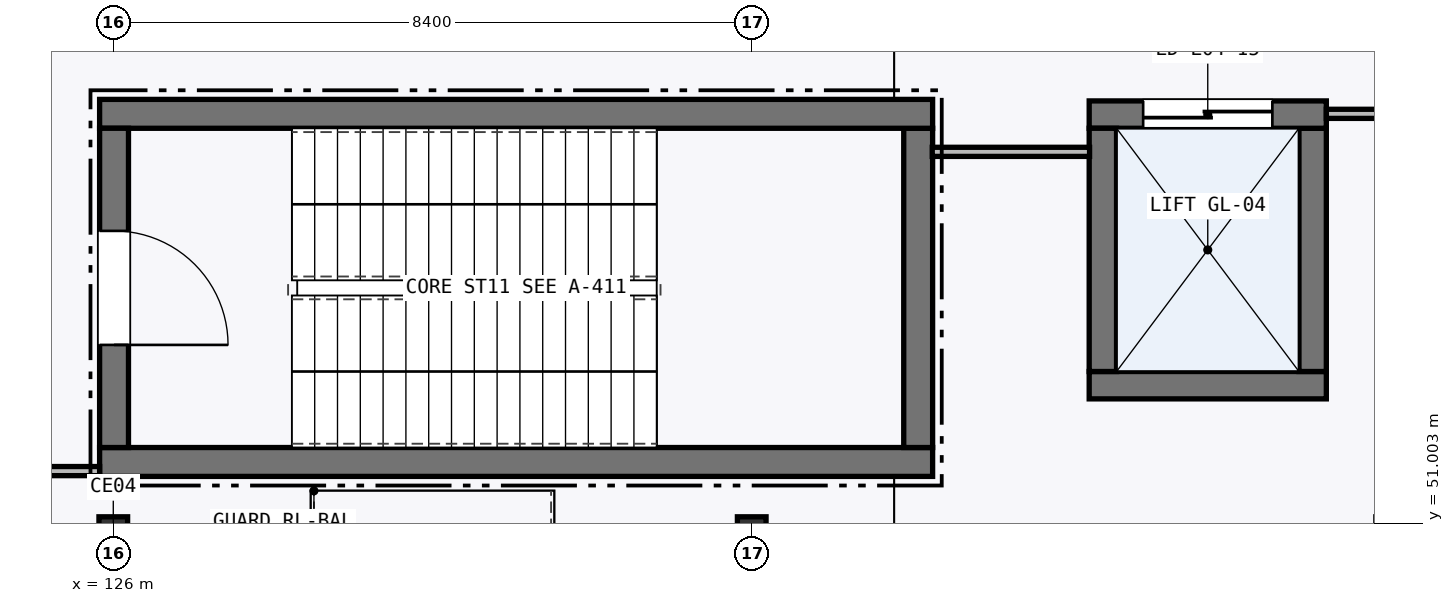
"""IFC4 building model, lengths in metres.
Left out: names, types, materials, properties, quantities, classifications, styles, units other than length and angle.
Written with IfcOpenShell. Run it as: python <this file> out.ifc"""

import sys

from ifc_helpers import new_model, si_unit, direction, frame, frame_2d, origin, origin_2d, place, context, subcontext, project, spatial, rectangle, hollow_circle, extrude, element, fill, save


model = new_model("IFC4")
c1 = context("Model", 3, precision=1e-05, world=origin(), true_north=direction((0.0, 1.0)))
c2 = subcontext(c1, "Body", "Model", "MODEL_VIEW")
j1 = project(units=[si_unit("LENGTHUNIT", "METRE"), si_unit("PLANEANGLEUNIT", "RADIAN")], contexts=[c1])
p1 = place(None, origin())
s1 = spatial("IfcSite", under=j1, at=p1, CompositionType="ELEMENT")
p2 = place(p1, origin())
s2 = spatial("IfcBuilding", under=s1, at=p2, CompositionType="ELEMENT")
p3 = place(p2, frame((0.0, 0.0, 16.5)))
s3 = spatial("IfcBuildingStorey", under=s2, at=p3, CompositionType="ELEMENT", Elevation=16.5)
for number, where, z_axis, x_axis in (
    (1, (126.0, 50.9, 0.0), (0.0, 0.0, 1.0), (1.0, 0.0, 0.0)),
    (2, (134.4, 50.9, 0.0), (0.0, 0.0, 1.0), (1.0, 0.0, 0.0)),
):
    element("IfcColumn", number, at=place(p3, frame(where, z_axis=z_axis, x_axis=x_axis)), inside=s3, PredefinedType="COLUMN", context=c2, shape_type="SweptSolid", body=[
        extrude(hollow_circle(Radius=0.188, WallThickness=0.014, at=origin_2d()), origin(), (0.0, 0.0, 1.0), 5.1),
    ])
p4 = place(p3, frame((125.82, 51.81, 0.0), z_axis=(0.0, 0.0, 1.0), x_axis=(1.0, 0.0, 0.0)))
e3 = element("IfcWall", 3, at=p4, inside=s3, PredefinedType="SHEAR", context=c2, shape_type="SweptSolid", body=[
    extrude(rectangle(XDim=10.96, YDim=0.38, at=frame_2d((5.48, 0.0))), origin(), (0.0, 0.0, 1.0), 4.845),
])
p5 = place(p3, frame((136.59, 52.0, 0.0), z_axis=(0.0, 0.0, 1.0), x_axis=(0.0, 1.0, 0.0)))
e4 = element("IfcWall", 4, at=p5, inside=s3, PredefinedType="SHEAR", context=c2, shape_type="SweptSolid", body=[
    extrude(rectangle(XDim=4.2, YDim=0.38, at=frame_2d((2.1, 0.0))), origin(), (0.0, 0.0, 1.0), 4.845),
])
p6 = place(p3, frame((136.78, 56.39, 0.0), z_axis=(0.0, 0.0, 1.0), x_axis=(-1.0, 0.0, 0.0)))
e5 = element("IfcWall", 5, at=p6, inside=s3, PredefinedType="SHEAR", context=c2, shape_type="SweptSolid", body=[
    extrude(rectangle(XDim=10.96, YDim=0.38, at=frame_2d((5.48, 0.0))), origin(), (0.0, 0.0, 1.0), 4.845),
])
p7 = place(p3, frame((126.01, 56.2, 0.0), z_axis=(0.0, 0.0, 1.0), x_axis=(0.0, -1.0, 0.0)))
e6 = element("IfcWall", 6, at=p7, inside=s3, PredefinedType="SHEAR", context=c2, shape_type="SweptSolid", body=[
    extrude(rectangle(XDim=4.2, YDim=0.38, at=frame_2d((2.1, 0.0))), origin(), (0.0, 0.0, 1.0), 4.845),
])
p8 = place(p7, frame((1.35, 0.0, 0.0)))
e7 = element("IfcOpeningElement", 7, at=p8, cuts=e6, PredefinedType="OPENING", context=c2, shape_type="SweptSolid", body=[
    extrude(rectangle(XDim=1.5, YDim=2.15, at=frame_2d((0.75, 1.075))), frame((0.0, 0.2, 0.0), z_axis=(0.0, -1.0, 0.0), x_axis=(1.0, 0.0, 0.0)), (0.0, 0.0, 1.0), 0.4),
])
p9 = place(p3, frame((138.84, 52.82, 0.0), z_axis=(0.0, 0.0, 1.0), x_axis=(1.0, 0.0, 0.0)))
e8 = element("IfcWall", 8, at=p9, inside=s3, PredefinedType="SHEAR", context=c2, shape_type="SweptSolid", body=[
    extrude(rectangle(XDim=3.12, YDim=0.36, at=frame_2d((1.56, 0.0))), origin(), (0.0, 0.0, 1.0), 4.845),
])
p10 = place(p3, frame((141.78, 53.0, 0.0), z_axis=(0.0, 0.0, 1.0), x_axis=(0.0, 1.0, 0.0)))
e9 = element("IfcWall", 9, at=p10, inside=s3, PredefinedType="SHEAR", context=c2, shape_type="SweptSolid", body=[
    extrude(rectangle(XDim=3.2, YDim=0.36, at=frame_2d((1.6, 0.0))), origin(), (0.0, 0.0, 1.0), 4.845),
])
p11 = place(p3, frame((141.96, 56.38, 0.0), z_axis=(0.0, 0.0, 1.0), x_axis=(-1.0, 0.0, 0.0)))
e10 = element("IfcWall", 10, at=p11, inside=s3, PredefinedType="SHEAR", context=c2, shape_type="SweptSolid", body=[
    extrude(rectangle(XDim=3.12, YDim=0.36, at=frame_2d((1.56, 0.0))), origin(), (0.0, 0.0, 1.0), 4.845),
])
p12 = place(p11, frame((0.71, 0.0, 0.0)))
e11 = element("IfcOpeningElement", 11, at=p12, cuts=e10, PredefinedType="OPENING", context=c2, shape_type="SweptSolid", body=[
    extrude(rectangle(XDim=1.7, YDim=2.3, at=frame_2d((0.85, 1.15))), frame((0.0, 0.19, 0.0), z_axis=(0.0, -1.0, 0.0), x_axis=(1.0, 0.0, 0.0)), (0.0, 0.0, 1.0), 0.38),
])
p13 = place(p3, frame((139.02, 56.2, 0.0), z_axis=(0.0, 0.0, 1.0), x_axis=(0.0, -1.0, 0.0)))
e12 = element("IfcWall", 12, at=p13, inside=s3, PredefinedType="SHEAR", context=c2, shape_type="SweptSolid", body=[
    extrude(rectangle(XDim=3.2, YDim=0.36, at=frame_2d((1.6, 0.0))), origin(), (0.0, 0.0, 1.0), 4.845),
])
p14 = place(p3, frame((143.0, 56.39, 0.0), z_axis=(0.0, 0.0, 1.0), x_axis=(-1.0, 0.0, 0.0)))
e13 = element("IfcWall", 13, at=p14, inside=s3, PredefinedType="PARTITIONING", context=c2, shape_type="SweptSolid", body=[
    extrude(rectangle(XDim=1.04, YDim=0.12, at=frame_2d((0.52, 0.0))), origin(), (0.0, 0.0, 1.0), 4.845),
])
p15 = place(p3, frame((138.845, 55.89, 0.0), z_axis=(0.0, 0.0, 1.0), x_axis=(-1.0, 0.0, 0.0)))
e14 = element("IfcWall", 14, at=p15, inside=s3, PredefinedType="PARTITIONING", context=c2, shape_type="SweptSolid", body=[
    extrude(rectangle(XDim=2.07, YDim=0.12, at=frame_2d((1.035, 0.0))), origin(), (0.0, 0.0, 1.0), 4.845),
])
p16 = place(p3, frame((125.82, 51.69, 0.0), z_axis=(0.0, 0.0, 1.0), x_axis=(-1.0, 0.0, 0.0)))
e15 = element("IfcWall", 15, at=p16, inside=s3, PredefinedType="PARTITIONING", context=c2, shape_type="SweptSolid", body=[
    extrude(rectangle(XDim=2.82, YDim=0.12, at=frame_2d((1.41, 0.0))), origin(), (0.0, 0.0, 1.0), 4.845),
])
p17 = place(p8, origin())
e16 = element("IfcDoor", 16, at=p17, inside=s3, OperationType="SINGLE_SWING_RIGHT", PredefinedType="DOOR", context=c2, shape_type="SweptSolid", body=[
    extrude(rectangle(XDim=1.5, YDim=2.15, at=frame_2d((0.75, 1.075))), frame((0.0, 0.025, 0.0), z_axis=(0.0, -1.0, 0.0), x_axis=(1.0, 0.0, 0.0)), (0.0, 0.0, 1.0), 0.05),
])
fill(e7, e16)
p18 = place(p12, frame((1.7, 0.0, 0.0), z_axis=(0.0, 0.0, 1.0), x_axis=(-1.0, 0.0, 0.0)))
e17 = element("IfcDoor", 17, at=p18, inside=s3, OperationType="DOUBLE_DOOR_SLIDING", PredefinedType="DOOR", context=c2, shape_type="SweptSolid", body=[
    extrude(rectangle(XDim=1.7, YDim=2.3, at=frame_2d((0.85, 1.15))), frame((0.0, 0.025, 0.0), z_axis=(0.0, -1.0, 0.0), x_axis=(1.0, 0.0, 0.0)), (0.0, 0.0, 1.0), 0.05),
])
fill(e11, e17)
save(model, sys.argv[1])
